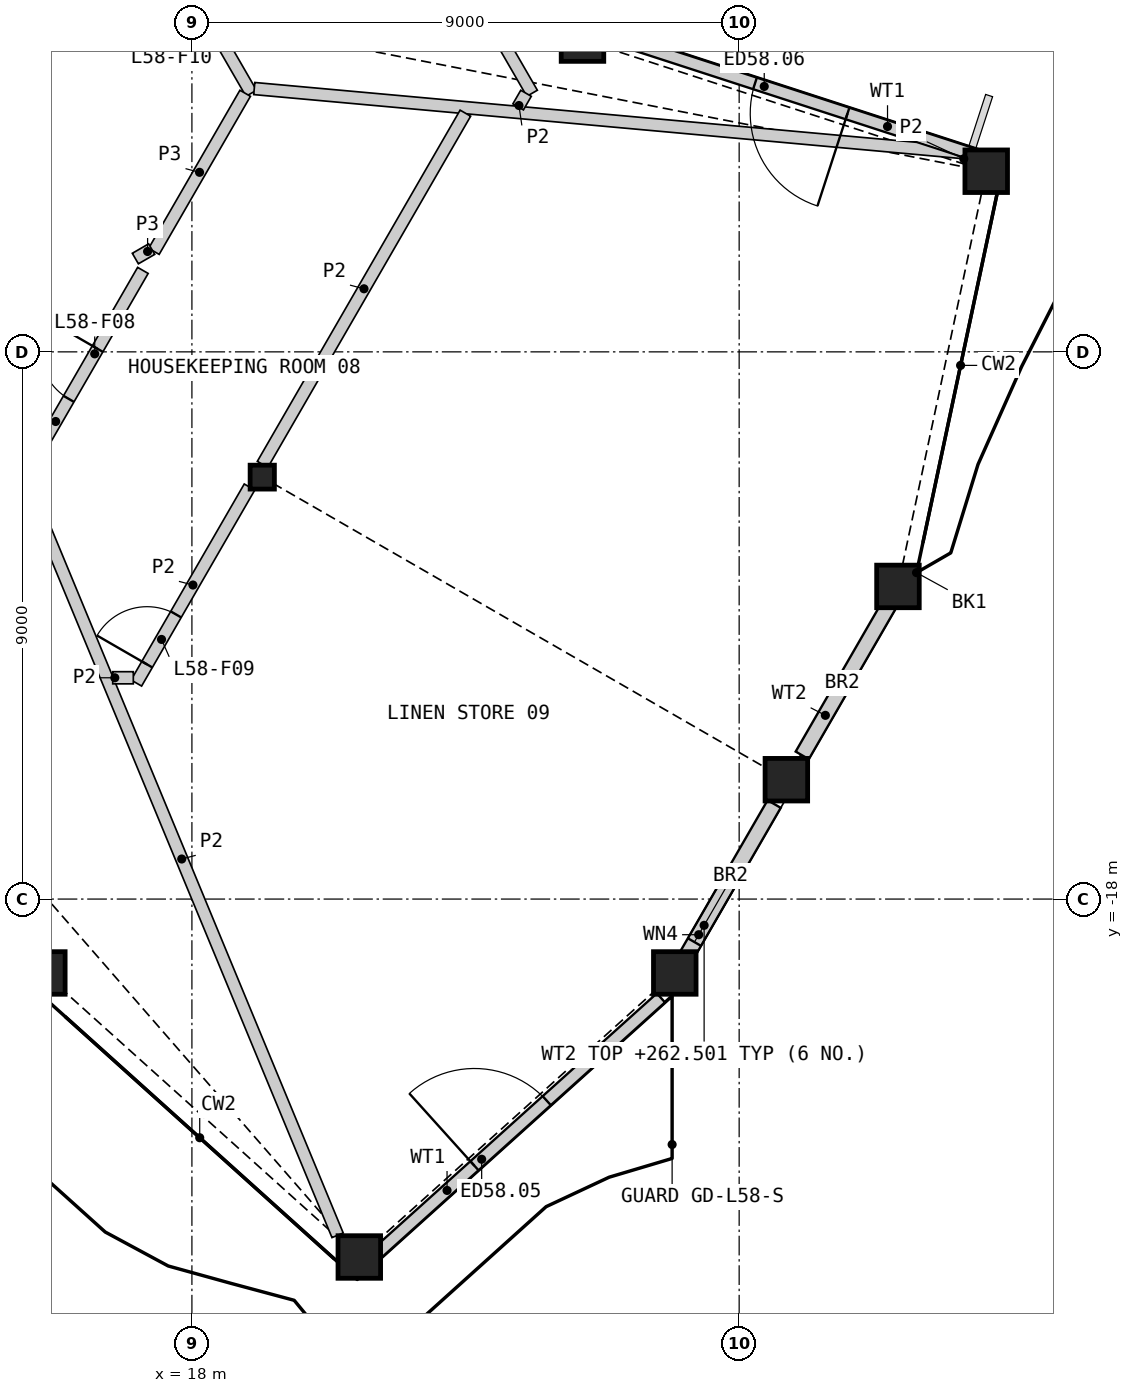
"""IFC4 building model, lengths in metres.
Left out: names, types, materials, properties, quantities, classifications, styles, units other than length and angle.
Written with IfcOpenShell. Run it as: python <this file> out.ifc"""

import sys

from ifc_helpers import new_model, si_unit, direction, frame, frame_2d, origin, origin_2d, place, context, subcontext, project, spatial, polyline, rectangle, hollow_rectangle, i_section, outline, extrude, element, fill, save


model = new_model("IFC4")
c1 = context("Model", 3, precision=1e-05, world=origin(), true_north=direction((0.0, 1.0)))
c2 = subcontext(c1, "Body", "Model", "MODEL_VIEW")
j1 = project(units=[si_unit("LENGTHUNIT", "METRE"), si_unit("PLANEANGLEUNIT", "RADIAN")], contexts=[c1])
p1 = place(None, origin())
s1 = spatial("IfcSite", under=j1, at=p1, CompositionType="ELEMENT")
p2 = place(p1, origin())
s2 = spatial("IfcBuilding", under=s1, at=p2, CompositionType="ELEMENT")
p3 = place(p2, frame((0.0, 0.0, 259.8)))
s3 = spatial("IfcBuildingStorey", under=s2, at=p3, CompositionType="ELEMENT", Elevation=259.8)
for number, where, z_axis, x_axis in (
    (1, (15.565, -19.215, 0.0), (0.0, 0.0, 1.0), (1.0, 0.0, 0.0)),
    (2, (20.753, -23.887, 0.0), (0.0, 0.0, 1.0), (1.0, 0.0, 0.0)),
    (3, (25.941, -19.215, 0.0), (0.0, 0.0, 1.0), (1.0, 0.0, 0.0)),
    (4, (27.776, -16.037, 0.0), (0.0, 0.0, 1.0), (1.0, 0.0, 0.0)),
    (5, (29.612, -12.858, 0.0), (0.0, 0.0, 1.0), (1.0, 0.0, 0.0)),
    (6, (31.063, -6.029, 0.0), (0.0, 0.0, 1.0), (1.0, 0.0, 0.0)),
    (7, (24.423, -3.872, 0.0), (0.0, 0.0, 1.0), (1.0, 0.0, 0.0)),
):
    element("IfcColumn", number, at=place(p3, frame(where, z_axis=z_axis, x_axis=x_axis)), inside=s3, PredefinedType="COLUMN", context=c2, shape_type="SweptSolid", body=[
        extrude(hollow_rectangle(XDim=0.7, YDim=0.7, WallThickness=0.045, at=origin_2d()), origin(), (0.0, 0.0, 1.0), 3.6),
    ])
p4 = place(p3, frame((19.157, -11.06, 0.0), z_axis=(0.0, 0.0, 1.0), x_axis=(1.0, 0.0, 0.0)))
e8 = element("IfcColumn", 8, at=p4, inside=s3, PredefinedType="COLUMN", context=c2, shape_type="SweptSolid", body=[
    extrude(i_section(OverallWidth=0.399, OverallDepth=0.393, WebThickness=0.023, FlangeThickness=0.037, at=origin_2d()), origin(), (0.0, 0.0, 1.0), 3.6),
])
p5 = place(p3, frame((21.023, -23.848, 0.0), z_axis=(0.0, 0.0, 1.0), x_axis=(0.74314024121, 0.669135697668, 0.0)))
e9 = element("IfcWall", 9, at=p5, inside=s3, PredefinedType="SOLIDWALL", context=c2, shape_type="SweptSolid", body=[
    extrude(rectangle(XDim=6.311, YDim=0.2, at=frame_2d((3.156, 0.0))), origin(), (0.0, 0.0, 1.0), 2.701),
])
p6 = place(p5, frame((2.184, 0.0, 0.0)))
e10 = element("IfcOpeningElement", 10, at=p6, cuts=e9, PredefinedType="OPENING", context=c2, shape_type="SweptSolid", body=[
    extrude(rectangle(XDim=1.6, YDim=2.4, at=frame_2d((0.8, 1.2))), frame((0.0, 0.11, 0.0), z_axis=(0.0, -1.0, 0.0), x_axis=(1.0, 0.0, 0.0)), (0.0, 0.0, 1.0), 0.22),
])
p7 = place(p3, frame((26.04, -19.097, 0.0), z_axis=(0.0, 0.0, 1.0), x_axis=(0.499976998774, 0.866038683141, 0.0)))
e11 = element("IfcWall", 11, at=p7, inside=s3, PredefinedType="SOLIDWALL", context=c2, shape_type="SweptSolid", body=[
    extrude(rectangle(XDim=3.072, YDim=0.25, at=frame_2d((1.536, 0.0))), origin(), (0.0, 0.0, 1.0), 2.701),
])
p8 = place(p7, frame((0.45, 0.0, 1.8)))
e12 = element("IfcOpeningElement", 12, at=p8, cuts=e11, PredefinedType="OPENING", context=c2, shape_type="SweptSolid", body=[
    extrude(rectangle(XDim=1.4, YDim=0.7, at=frame_2d((0.7, 0.35))), frame((0.0, 0.135, 0.0), z_axis=(0.0, -1.0, 0.0), x_axis=(1.0, 0.0, 0.0)), (0.0, 0.0, 1.0), 0.27),
])
p9 = place(p3, frame((28.038, -15.637, 0.0), z_axis=(0.0, 0.0, 1.0), x_axis=(0.500023511883, 0.866011828767, 0.0)))
e13 = element("IfcWall", 13, at=p9, inside=s3, PredefinedType="SOLIDWALL", context=c2, shape_type="SweptSolid", body=[
    extrude(rectangle(XDim=3.042, YDim=0.25, at=frame_2d((1.521, 0.0))), origin(), (0.0, 0.0, 1.0), 2.701),
])
p10 = place(p3, frame((30.859, -5.754, 0.0), z_axis=(0.0, 0.0, 1.0), x_axis=(-0.951049400374, 0.309038894069, 0.0)))
e14 = element("IfcWall", 14, at=p10, inside=s3, PredefinedType="SOLIDWALL", context=c2, shape_type="SweptSolid", body=[
    extrude(rectangle(XDim=5.968, YDim=0.2, at=frame_2d((2.984, 0.0))), origin(), (0.0, 0.0, 1.0), 2.701),
])
p11 = place(p10, frame((2.184, 0.0, 0.0)))
e15 = element("IfcOpeningElement", 15, at=p11, cuts=e14, PredefinedType="OPENING", context=c2, shape_type="SweptSolid", body=[
    extrude(rectangle(XDim=1.6, YDim=2.4, at=frame_2d((0.8, 1.2))), frame((0.0, 0.11, 0.0), z_axis=(0.0, -1.0, 0.0), x_axis=(1.0, 0.0, 0.0)), (0.0, 0.0, 1.0), 0.22),
])
p12 = place(p3, frame((5.377, 18.807, 0.0), z_axis=(0.0, 0.0, 1.0), x_axis=(0.499999852422, -0.866025488988, 0.0)))
e16 = element("IfcWall", 16, at=p12, inside=s3, PredefinedType="PARTITIONING", context=c2, shape_type="SweptSolid", body=[
    extrude(rectangle(XDim=27.198, YDim=0.2, at=frame_2d((13.599, 0.0))), origin(), (0.0, 0.0, 1.0), 3.25),
])
p13 = place(p12, frame((25.096, 0.0, 0.0)))
e17 = element("IfcOpeningElement", 17, at=p13, cuts=e16, PredefinedType="OPENING", context=c2, shape_type="SweptSolid", body=[
    extrude(rectangle(XDim=0.95, YDim=2.1, at=frame_2d((0.475, 1.05))), frame((0.0, 0.11, 0.0), z_axis=(0.0, -1.0, 0.0), x_axis=(1.0, 0.0, 0.0)), (0.0, 0.0, 1.0), 0.22),
])
p14 = place(p12, frame((19.122, 0.0, 0.0)))
e18 = element("IfcOpeningElement", 18, at=p14, cuts=e16, PredefinedType="OPENING", context=c2, shape_type="SweptSolid", body=[
    extrude(rectangle(XDim=1.0, YDim=2.1, at=frame_2d((0.5, 1.05))), frame((0.0, 0.11, 0.0), z_axis=(0.0, -1.0, 0.0), x_axis=(1.0, 0.0, 0.0)), (0.0, 0.0, 1.0), 0.22),
])
p15 = place(p12, frame((17.115, 0.0, 0.0)))
e19 = element("IfcOpeningElement", 19, at=p15, cuts=e16, PredefinedType="OPENING", context=c2, shape_type="SweptSolid", body=[
    extrude(rectangle(XDim=1.1, YDim=2.1, at=frame_2d((0.55, 1.05))), frame((0.0, 0.11, 0.0), z_axis=(0.0, -1.0, 0.0), x_axis=(1.0, 0.0, 0.0)), (0.0, 0.0, 1.0), 0.22),
])
p16 = place(p12, frame((0.35, 0.0, 0.0)))
e20 = element("IfcOpeningElement", 20, at=p16, cuts=e16, PredefinedType="OPENING", context=c2, shape_type="SweptSolid", body=[
    extrude(rectangle(XDim=1.1, YDim=2.1, at=frame_2d((0.55, 1.05))), frame((0.0, 0.11, 0.0), z_axis=(0.0, -1.0, 0.0), x_axis=(1.0, 0.0, 0.0)), (0.0, 0.0, 1.0), 0.22),
])
p17 = place(p3, frame((15.281, -10.974, 0.0), z_axis=(0.0, 0.0, 1.0), x_axis=(0.499989446428, 0.866031496806, 0.0)))
e21 = element("IfcWall", 21, at=p17, inside=s3, PredefinedType="PARTITIONING", context=c2, shape_type="SweptSolid", body=[
    extrude(rectangle(XDim=3.826, YDim=0.2, at=frame_2d((1.913, 0.0))), origin(), (0.0, 0.0, 1.0), 3.25),
])
p18 = place(p17, frame((1.386, 0.0, 0.0)))
e22 = element("IfcOpeningElement", 22, at=p18, cuts=e21, PredefinedType="OPENING", context=c2, shape_type="SweptSolid", body=[
    extrude(rectangle(XDim=0.95, YDim=2.1, at=frame_2d((0.475, 1.05))), frame((0.0, 0.11, 0.0), z_axis=(0.0, -1.0, 0.0), x_axis=(1.0, 0.0, 0.0)), (0.0, 0.0, 1.0), 0.22),
])
p19 = place(p3, frame((17.375, -7.347, 0.0), z_axis=(0.0, 0.0, 1.0), x_axis=(0.499952404951, 0.866052881055, 0.0)))
e23 = element("IfcWall", 23, at=p19, inside=s3, PredefinedType="PARTITIONING", context=c2, shape_type="SweptSolid", body=[
    extrude(rectangle(XDim=3.002, YDim=0.2, at=frame_2d((1.501, 0.0))), origin(), (0.0, 0.0, 1.0), 3.25),
])
p20 = place(p3, frame((17.07, -7.465, 0.0), z_axis=(0.0, 0.0, 1.0), x_axis=(0.866054481515, 0.499949632511, 0.0)))
e24 = element("IfcWall", 24, at=p20, inside=s3, PredefinedType="PARTITIONING", context=c2, shape_type="SweptSolid", body=[
    extrude(rectangle(XDim=0.31, YDim=0.2, at=frame_2d((0.155, 0.0))), origin(), (0.0, 0.0, 1.0), 3.25),
])
p21 = place(p3, frame((15.269, -11.153, 0.0), z_axis=(0.0, 0.0, 1.0), x_axis=(0.382692998932, -0.923875569851, 0.0)))
e25 = element("IfcWall", 25, at=p21, inside=s3, PredefinedType="PARTITIONING", context=c2, shape_type="SweptSolid", body=[
    extrude(rectangle(XDim=13.397, YDim=0.2, at=frame_2d((6.698, 0.0))), origin(), (0.0, 0.0, 1.0), 2.404),
])
p22 = place(p3, origin())
e26 = element("IfcWall", 26, at=p22, inside=s3, PredefinedType="PARTITIONING", context=c2, shape_type="SweptSolid", body=[
    extrude(outline(polyline([(30.694, -5.824), (19.017, -4.769), (19.034, -4.57), (29.918, -5.553), (30.696, -5.806), (30.694, -5.824)])), origin(), (0.0, 0.0, 1.0), 2.404),
])
p23 = place(p3, frame((19.162, -10.851, 0.0), z_axis=(0.0, 0.0, 1.0), x_axis=(0.500008654708, 0.866020406929, 0.0)))
e27 = element("IfcWall", 27, at=p23, inside=s3, PredefinedType="PARTITIONING", context=c2, shape_type="SweptSolid", body=[
    extrude(rectangle(XDim=6.67, YDim=0.2, at=frame_2d((3.335, 0.0))), origin(), (0.0, 0.0, 1.0), 2.404),
])
p24 = place(p3, frame((20.87, -0.028, 0.0), z_axis=(0.0, 0.0, 1.0), x_axis=(0.499993928037, -0.866028909405, 0.0)))
e28 = element("IfcWall", 28, at=p24, inside=s3, PredefinedType="PARTITIONING", context=c2, shape_type="SweptSolid", body=[
    extrude(rectangle(XDim=5.449, YDim=0.2, at=frame_2d((2.725, 0.0))), origin(), (0.0, 0.0, 1.0), 2.404),
])
p25 = place(p24, frame((1.583, 0.0, 0.0)))
e29 = element("IfcOpeningElement", 29, at=p25, cuts=e28, PredefinedType="OPENING", context=c2, shape_type="SweptSolid", body=[
    extrude(rectangle(XDim=0.95, YDim=2.1, at=frame_2d((0.475, 1.05))), frame((0.0, 0.11, 0.0), z_axis=(0.0, -1.0, 0.0), x_axis=(1.0, 0.0, 0.0)), (0.0, 0.0, 1.0), 0.22),
])
p26 = place(p3, frame((17.086, -14.447, 0.0), z_axis=(0.0, 0.0, 1.0), x_axis=(0.500004411858, 0.866022856582, 0.0)))
e30 = element("IfcWall", 30, at=p26, inside=s3, PredefinedType="PARTITIONING", context=c2, shape_type="SweptSolid", body=[
    extrude(rectangle(XDim=3.723, YDim=0.2, at=frame_2d((1.861, 0.0))), origin(), (0.0, 0.0, 1.0), 2.404),
])
p27 = place(p26, frame((0.353, 0.0, 0.0)))
e31 = element("IfcOpeningElement", 31, at=p27, cuts=e30, PredefinedType="OPENING", context=c2, shape_type="SweptSolid", body=[
    extrude(rectangle(XDim=0.95, YDim=2.1, at=frame_2d((0.475, 1.05))), frame((0.0, 0.11, 0.0), z_axis=(0.0, -1.0, 0.0), x_axis=(1.0, 0.0, 0.0)), (0.0, 0.0, 1.0), 0.22),
])
p28 = place(p3, frame((16.698, -14.36, 0.0), z_axis=(0.0, 0.0, 1.0), x_axis=(1.0, 0.0, 0.0)))
e32 = element("IfcWall", 32, at=p28, inside=s3, PredefinedType="PARTITIONING", context=c2, shape_type="SweptSolid", body=[
    extrude(rectangle(XDim=0.338, YDim=0.2, at=frame_2d((0.169, 0.0))), origin(), (0.0, 0.0, 1.0), 2.404),
])
p29 = place(p3, frame((23.366, -4.97, 0.0), z_axis=(0.0, 0.0, 1.0), x_axis=(0.500104332946, 0.86596515875, 0.0)))
e33 = element("IfcWall", 33, at=p29, inside=s3, PredefinedType="PARTITIONING", context=c2, shape_type="SweptSolid", body=[
    extrude(rectangle(XDim=0.258, YDim=0.2, at=frame_2d((0.129, 0.0))), origin(), (0.0, 0.0, 1.0), 2.404),
])
p30 = place(p6, origin())
e34 = element("IfcDoor", 34, at=p30, inside=s3, OperationType="DOUBLE_DOOR_SINGLE_SWING", PredefinedType="DOOR", context=c2, shape_type="SweptSolid", body=[
    extrude(rectangle(XDim=1.6, YDim=2.4, at=frame_2d((0.8, 1.2))), frame((0.0, 0.025, 0.0), z_axis=(0.0, -1.0, 0.0), x_axis=(1.0, 0.0, 0.0)), (0.0, 0.0, 1.0), 0.05),
])
fill(e10, e34)
p31 = place(p8, origin())
e35 = element("IfcWindow", 35, at=p31, inside=s3, PartitioningType="SINGLE_PANEL", PredefinedType="WINDOW", context=c2, shape_type="SweptSolid", body=[
    extrude(rectangle(XDim=1.4, YDim=0.7, at=frame_2d((0.7, 0.35))), frame((0.0, 0.03, 0.0), z_axis=(0.0, -1.0, 0.0), x_axis=(1.0, 0.0, 0.0)), (0.0, 0.0, 1.0), 0.06),
])
fill(e12, e35)
p32 = place(p11, origin())
e36 = element("IfcDoor", 36, at=p32, inside=s3, OperationType="DOUBLE_DOOR_SINGLE_SWING", PredefinedType="DOOR", context=c2, shape_type="SweptSolid", body=[
    extrude(rectangle(XDim=1.6, YDim=2.4, at=frame_2d((0.8, 1.2))), frame((0.0, 0.025, 0.0), z_axis=(0.0, -1.0, 0.0), x_axis=(1.0, 0.0, 0.0)), (0.0, 0.0, 1.0), 0.05),
])
fill(e15, e36)
p33 = place(p18, origin())
e37 = element("IfcDoor", 37, at=p33, inside=s3, OperationType="SINGLE_SWING_RIGHT", PredefinedType="DOOR", context=c2, shape_type="SweptSolid", body=[
    extrude(rectangle(XDim=0.95, YDim=2.1, at=frame_2d((0.475, 1.05))), frame((0.0, 0.025, 0.0), z_axis=(0.0, -1.0, 0.0), x_axis=(1.0, 0.0, 0.0)), (0.0, 0.0, 1.0), 0.05),
])
fill(e22, e37)
p34 = place(p27, origin())
e38 = element("IfcDoor", 38, at=p34, inside=s3, OperationType="SINGLE_SWING_LEFT", PredefinedType="DOOR", context=c2, shape_type="SweptSolid", body=[
    extrude(rectangle(XDim=0.95, YDim=2.1, at=frame_2d((0.475, 1.05))), frame((0.0, 0.025, 0.0), z_axis=(0.0, -1.0, 0.0), x_axis=(1.0, 0.0, 0.0)), (0.0, 0.0, 1.0), 0.05),
])
fill(e31, e38)
save(model, sys.argv[1])
